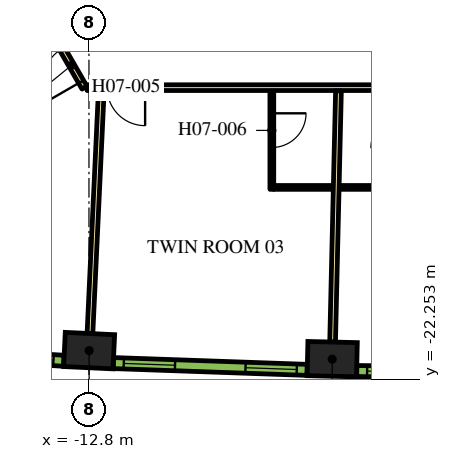
"""IFC4 building model, lengths in metres.
Left out: names, types, materials, properties, quantities, classifications, styles, units other than length and angle.
Written with IfcOpenShell. Run it as: python <this file> out.ifc"""

import sys

from ifc_helpers import new_model, si_unit, direction, frame, frame_2d, origin, origin_2d, place, context, subcontext, project, spatial, rectangle, extrude, element, fill, save


model = new_model("IFC4")
c1 = context("Model", 3, precision=1e-05, world=origin(), true_north=direction((0.0, 1.0)))
c2 = subcontext(c1, "Body", "Model", "MODEL_VIEW")
j1 = project(units=[si_unit("LENGTHUNIT", "METRE"), si_unit("PLANEANGLEUNIT", "RADIAN")], contexts=[c1])
p1 = place(None, origin())
s1 = spatial("IfcSite", under=j1, at=p1, CompositionType="ELEMENT")
p2 = place(p1, origin())
s2 = spatial("IfcBuilding", under=s1, at=p2, CompositionType="ELEMENT")
p3 = place(p2, frame((0.0, 0.0, 103.2)))
s3 = spatial("IfcBuildingStorey", under=s2, at=p3, CompositionType="ELEMENT", Elevation=103.2)
for number, where, z_axis, x_axis in (
    (1, (-12.795, -21.494, 0.0), (0.0, 0.0, 1.0), (0.999, -0.047, 0.0)),
    (2, (-6.399, -21.719, 0.0), (0.0, 0.0, 1.0), (1.0, -0.023, 0.0)),
):
    element("IfcColumn", number, at=place(p3, frame(where, z_axis=z_axis, x_axis=x_axis)), inside=s3, PredefinedType="COLUMN", context=c2, shape_type="SweptSolid", body=[
        extrude(rectangle(XDim=1.3, YDim=0.9, at=origin_2d()), origin(), (0.0, 0.0, 1.0), 3.9),
    ])
p4 = place(p3, frame((-12.918, -14.575, 0.0), z_axis=(0.0, 0.0, 1.0), x_axis=(-0.500009150678, 0.866020120573, 0.0)))
e3 = element("IfcWall", 3, at=p4, inside=s3, PredefinedType="PARTITIONING", context=c2, shape_type="SweptSolid", body=[
    extrude(rectangle(XDim=5.258, YDim=0.15, at=frame_2d((2.629, 0.0))), origin(), (0.0, 0.0, 1.0), 2.75),
])
p5 = place(p4, frame((0.18, 0.0, 0.0)))
e4 = element("IfcOpeningElement", 4, at=p5, cuts=e3, PredefinedType="OPENING", context=c2, shape_type="SweptSolid", body=[
    extrude(rectangle(XDim=1.0, YDim=2.1, at=frame_2d((0.5, 1.05))), frame((0.0, 0.085, 0.0), z_axis=(0.0, -1.0, 0.0), x_axis=(1.0, 0.0, 0.0)), (0.0, 0.0, 1.0), 0.17),
])
p6 = place(p3, frame((12.918, -14.575, 0.0), z_axis=(0.0, 0.0, 1.0), x_axis=(-1.0, 0.0, 0.0)))
e5 = element("IfcWall", 5, at=p6, inside=s3, PredefinedType="PARTITIONING", context=c2, shape_type="SweptSolid", body=[
    extrude(rectangle(XDim=25.766, YDim=0.15, at=frame_2d((12.883, 0.0))), origin(), (0.0, 0.0, 1.0), 2.75),
])
p7 = place(p6, frame((24.24, 0.0, 0.0)))
e6 = element("IfcOpeningElement", 6, at=p7, cuts=e5, PredefinedType="OPENING", context=c2, shape_type="SweptSolid", body=[
    extrude(rectangle(XDim=1.0, YDim=2.1, at=frame_2d((0.5, 1.05))), frame((0.0, 0.085, 0.0), z_axis=(0.0, -1.0, 0.0), x_axis=(1.0, 0.0, 0.0)), (0.0, 0.0, 1.0), 0.17),
])
p8 = place(p6, frame((13.144, 0.0, 0.0)))
e7 = element("IfcOpeningElement", 7, at=p8, cuts=e5, PredefinedType="OPENING", context=c2, shape_type="SweptSolid", body=[
    extrude(rectangle(XDim=1.0, YDim=2.1, at=frame_2d((0.5, 1.05))), frame((0.0, 0.085, 0.0), z_axis=(0.0, -1.0, 0.0), x_axis=(1.0, 0.0, 0.0)), (0.0, 0.0, 1.0), 0.17),
])
p9 = place(p6, frame((11.693, 0.0, 0.0)))
e8 = element("IfcOpeningElement", 8, at=p9, cuts=e5, PredefinedType="OPENING", context=c2, shape_type="SweptSolid", body=[
    extrude(rectangle(XDim=1.0, YDim=2.1, at=frame_2d((0.5, 1.05))), frame((0.0, 0.085, 0.0), z_axis=(0.0, -1.0, 0.0), x_axis=(1.0, 0.0, 0.0)), (0.0, 0.0, 1.0), 0.17),
])
p10 = place(p6, frame((0.596, 0.0, 0.0)))
e9 = element("IfcOpeningElement", 9, at=p10, cuts=e5, PredefinedType="OPENING", context=c2, shape_type="SweptSolid", body=[
    extrude(rectangle(XDim=1.0, YDim=2.1, at=frame_2d((0.5, 1.05))), frame((0.0, 0.085, 0.0), z_axis=(0.0, -1.0, 0.0), x_axis=(1.0, 0.0, 0.0)), (0.0, 0.0, 1.0), 0.17),
])
p11 = place(p3, frame((-12.774, -21.045, 0.0), z_axis=(0.0, 0.0, 1.0), x_axis=(0.046750341626, 0.998906605023, 0.0)))
e10 = element("IfcWall", 10, at=p11, inside=s3, PredefinedType="PARTITIONING", context=c2, shape_type="SweptSolid", body=[
    extrude(rectangle(XDim=6.392, YDim=0.15, at=frame_2d((3.196, 0.0))), origin(), (0.0, 0.0, 1.0), 2.75),
])
p12 = place(p3, frame((-6.389, -21.269, 0.0), z_axis=(0.0, 0.0, 1.0), x_axis=(0.023377429176, 0.999726710559, 0.0)))
e11 = element("IfcWall", 11, at=p12, inside=s3, PredefinedType="PARTITIONING", context=c2, shape_type="SweptSolid", body=[
    extrude(rectangle(XDim=6.611, YDim=0.15, at=frame_2d((3.305, 0.0))), origin(), (0.0, 0.0, 1.0), 2.75),
])
p13 = place(p3, frame((-7.988, -14.65, 0.0), z_axis=(0.0, 0.0, 1.0), x_axis=(0.0, -1.0, 0.0)))
e12 = element("IfcWall", 12, at=p13, inside=s3, PredefinedType="PARTITIONING", context=c2, shape_type="SweptSolid", body=[
    extrude(rectangle(XDim=2.6, YDim=0.1, at=frame_2d((1.3, 0.0))), origin(), (0.0, 0.0, 1.0), 2.75),
])
p14 = place(p13, frame((0.6, 0.0, 0.0)))
e13 = element("IfcOpeningElement", 13, at=p14, cuts=e12, PredefinedType="OPENING", context=c2, shape_type="SweptSolid", body=[
    extrude(rectangle(XDim=0.9, YDim=2.1, at=frame_2d((0.45, 1.05))), frame((0.0, 0.06, 0.0), z_axis=(0.0, -1.0, 0.0), x_axis=(1.0, 0.0, 0.0)), (0.0, 0.0, 1.0), 0.12),
])
p15 = place(p3, frame((-7.938, -17.2, 0.0), z_axis=(0.0, 0.0, 1.0), x_axis=(1.0, 0.0, 0.0)))
e14 = element("IfcWall", 14, at=p15, inside=s3, PredefinedType="PARTITIONING", context=c2, shape_type="SweptSolid", body=[
    extrude(rectangle(XDim=1.56, YDim=0.1, at=frame_2d((0.78, 0.0))), origin(), (0.0, 0.0, 1.0), 2.75),
])
p16 = place(p3, frame((-4.53, -17.2, 0.0), z_axis=(0.0, 0.0, 1.0), x_axis=(-1.0, 0.0, 0.0)))
e15 = element("IfcWall", 15, at=p16, inside=s3, PredefinedType="PARTITIONING", context=c2, shape_type="SweptSolid", body=[
    extrude(rectangle(XDim=1.68, YDim=0.1, at=frame_2d((0.84, 0.0))), origin(), (0.0, 0.0, 1.0), 2.75),
])
p17 = place(p3, frame((-18.553, -21.463, 0.0), z_axis=(0.0, 0.0, 1.0), x_axis=(0.998290511436, -0.058447025388, 0.0)))
e16 = element("IfcWall", 16, at=p17, inside=s3, PredefinedType="SOLIDWALL", context=c2, shape_type="SweptSolid", body=[
    extrude(rectangle(XDim=5.1, YDim=0.29, at=frame_2d((2.55, 0.0))), origin(), (0.0, 0.0, 1.0), 3.65),
])
p18 = place(p17, frame((0.273, 0.0, 0.9)))
e17 = element("IfcOpeningElement", 17, at=p18, cuts=e16, PredefinedType="OPENING", context=c2, shape_type="SweptSolid", body=[
    extrude(rectangle(XDim=1.35, YDim=2.15, at=frame_2d((0.675, 1.075))), frame((0.0, 0.155, 0.0), z_axis=(0.0, -1.0, 0.0), x_axis=(1.0, 0.0, 0.0)), (0.0, 0.0, 1.0), 0.31),
])
p19 = place(p17, frame((3.478, 0.0, 0.9)))
e18 = element("IfcOpeningElement", 18, at=p19, cuts=e16, PredefinedType="OPENING", context=c2, shape_type="SweptSolid", body=[
    extrude(rectangle(XDim=1.35, YDim=2.15, at=frame_2d((0.675, 1.075))), frame((0.0, 0.155, 0.0), z_axis=(0.0, -1.0, 0.0), x_axis=(1.0, 0.0, 0.0)), (0.0, 0.0, 1.0), 0.31),
])
p20 = place(p3, frame((-12.157, -21.822, 0.0), z_axis=(0.0, 0.0, 1.0), x_axis=(0.999385993957, -0.035037623812, 0.0)))
e19 = element("IfcWall", 19, at=p20, inside=s3, PredefinedType="SOLIDWALL", context=c2, shape_type="SweptSolid", body=[
    extrude(rectangle(XDim=5.101, YDim=0.29, at=frame_2d((2.55, 0.0))), origin(), (0.0, 0.0, 1.0), 3.65),
])
p21 = place(p20, frame((0.273, 0.0, 0.9)))
e20 = element("IfcOpeningElement", 20, at=p21, cuts=e19, PredefinedType="OPENING", context=c2, shape_type="SweptSolid", body=[
    extrude(rectangle(XDim=1.35, YDim=2.15, at=frame_2d((0.675, 1.075))), frame((0.0, 0.155, 0.0), z_axis=(0.0, -1.0, 0.0), x_axis=(1.0, 0.0, 0.0)), (0.0, 0.0, 1.0), 0.31),
])
p22 = place(p20, frame((3.478, 0.0, 0.9)))
e21 = element("IfcOpeningElement", 21, at=p22, cuts=e19, PredefinedType="OPENING", context=c2, shape_type="SweptSolid", body=[
    extrude(rectangle(XDim=1.35, YDim=2.15, at=frame_2d((0.675, 1.075))), frame((0.0, 0.155, 0.0), z_axis=(0.0, -1.0, 0.0), x_axis=(1.0, 0.0, 0.0)), (0.0, 0.0, 1.0), 0.31),
])
p23 = place(p3, frame((-5.753, -22.031, 0.0), z_axis=(0.0, 0.0, 1.0), x_axis=(0.999931786565, -0.011679992145, 0.0)))
e22 = element("IfcWall", 22, at=p23, inside=s3, PredefinedType="SOLIDWALL", context=c2, shape_type="SweptSolid", body=[
    extrude(rectangle(XDim=5.1, YDim=0.29, at=frame_2d((2.55, 0.0))), origin(), (0.0, 0.0, 1.0), 3.65),
])
p24 = place(p23, frame((0.272, 0.0, 0.9)))
e23 = element("IfcOpeningElement", 23, at=p24, cuts=e22, PredefinedType="OPENING", context=c2, shape_type="SweptSolid", body=[
    extrude(rectangle(XDim=1.35, YDim=2.15, at=frame_2d((0.675, 1.075))), frame((0.0, 0.155, 0.0), z_axis=(0.0, -1.0, 0.0), x_axis=(1.0, 0.0, 0.0)), (0.0, 0.0, 1.0), 0.31),
])
p25 = place(p23, frame((3.478, 0.0, 0.9)))
e24 = element("IfcOpeningElement", 24, at=p25, cuts=e22, PredefinedType="OPENING", context=c2, shape_type="SweptSolid", body=[
    extrude(rectangle(XDim=1.35, YDim=2.15, at=frame_2d((0.675, 1.075))), frame((0.0, 0.155, 0.0), z_axis=(0.0, -1.0, 0.0), x_axis=(1.0, 0.0, 0.0)), (0.0, 0.0, 1.0), 0.31),
])
p26 = place(p5, origin())
e25 = element("IfcDoor", 25, at=p26, inside=s3, OperationType="SINGLE_SWING_LEFT", PredefinedType="DOOR", context=c2, shape_type="SweptSolid", body=[
    extrude(rectangle(XDim=1.0, YDim=2.1, at=frame_2d((0.5, 1.05))), frame((0.0, 0.025, 0.0), z_axis=(0.0, -1.0, 0.0), x_axis=(1.0, 0.0, 0.0)), (0.0, 0.0, 1.0), 0.05),
])
fill(e4, e25)
p27 = place(p7, origin())
e26 = element("IfcDoor", 26, at=p27, inside=s3, OperationType="SINGLE_SWING_RIGHT", PredefinedType="DOOR", context=c2, shape_type="SweptSolid", body=[
    extrude(rectangle(XDim=1.0, YDim=2.1, at=frame_2d((0.5, 1.05))), frame((0.0, 0.025, 0.0), z_axis=(0.0, -1.0, 0.0), x_axis=(1.0, 0.0, 0.0)), (0.0, 0.0, 1.0), 0.05),
])
fill(e6, e26)
p28 = place(p14, origin())
e27 = element("IfcDoor", 27, at=p28, inside=s3, OperationType="SINGLE_SWING_RIGHT", PredefinedType="DOOR", context=c2, shape_type="SweptSolid", body=[
    extrude(rectangle(XDim=0.9, YDim=2.1, at=frame_2d((0.45, 1.05))), frame((0.0, 0.025, 0.0), z_axis=(0.0, -1.0, 0.0), x_axis=(1.0, 0.0, 0.0)), (0.0, 0.0, 1.0), 0.05),
])
fill(e13, e27)
p29 = place(p19, origin())
e28 = element("IfcWindow", 28, at=p29, inside=s3, PartitioningType="DOUBLE_PANEL_VERTICAL", PredefinedType="WINDOW", context=c2, shape_type="SweptSolid", body=[
    extrude(rectangle(XDim=1.35, YDim=2.15, at=frame_2d((0.675, 1.075))), frame((0.0, 0.015, 0.0), z_axis=(0.0, -1.0, 0.0), x_axis=(1.0, 0.0, 0.0)), (0.0, 0.0, 1.0), 0.06),
])
fill(e18, e28)
p30 = place(p21, origin())
e29 = element("IfcWindow", 29, at=p30, inside=s3, PartitioningType="DOUBLE_PANEL_VERTICAL", PredefinedType="WINDOW", context=c2, shape_type="SweptSolid", body=[
    extrude(rectangle(XDim=1.35, YDim=2.15, at=frame_2d((0.675, 1.075))), frame((0.0, 0.015, 0.0), z_axis=(0.0, -1.0, 0.0), x_axis=(1.0, 0.0, 0.0)), (0.0, 0.0, 1.0), 0.06),
])
fill(e20, e29)
p31 = place(p22, origin())
e30 = element("IfcWindow", 30, at=p31, inside=s3, PartitioningType="DOUBLE_PANEL_VERTICAL", PredefinedType="WINDOW", context=c2, shape_type="SweptSolid", body=[
    extrude(rectangle(XDim=1.35, YDim=2.15, at=frame_2d((0.675, 1.075))), frame((0.0, 0.015, 0.0), z_axis=(0.0, -1.0, 0.0), x_axis=(1.0, 0.0, 0.0)), (0.0, 0.0, 1.0), 0.06),
])
fill(e21, e30)
p32 = place(p24, origin())
e31 = element("IfcWindow", 31, at=p32, inside=s3, PartitioningType="DOUBLE_PANEL_VERTICAL", PredefinedType="WINDOW", context=c2, shape_type="SweptSolid", body=[
    extrude(rectangle(XDim=1.35, YDim=2.15, at=frame_2d((0.675, 1.075))), frame((0.0, 0.015, 0.0), z_axis=(0.0, -1.0, 0.0), x_axis=(1.0, 0.0, 0.0)), (0.0, 0.0, 1.0), 0.06),
])
fill(e23, e31)
save(model, sys.argv[1])
